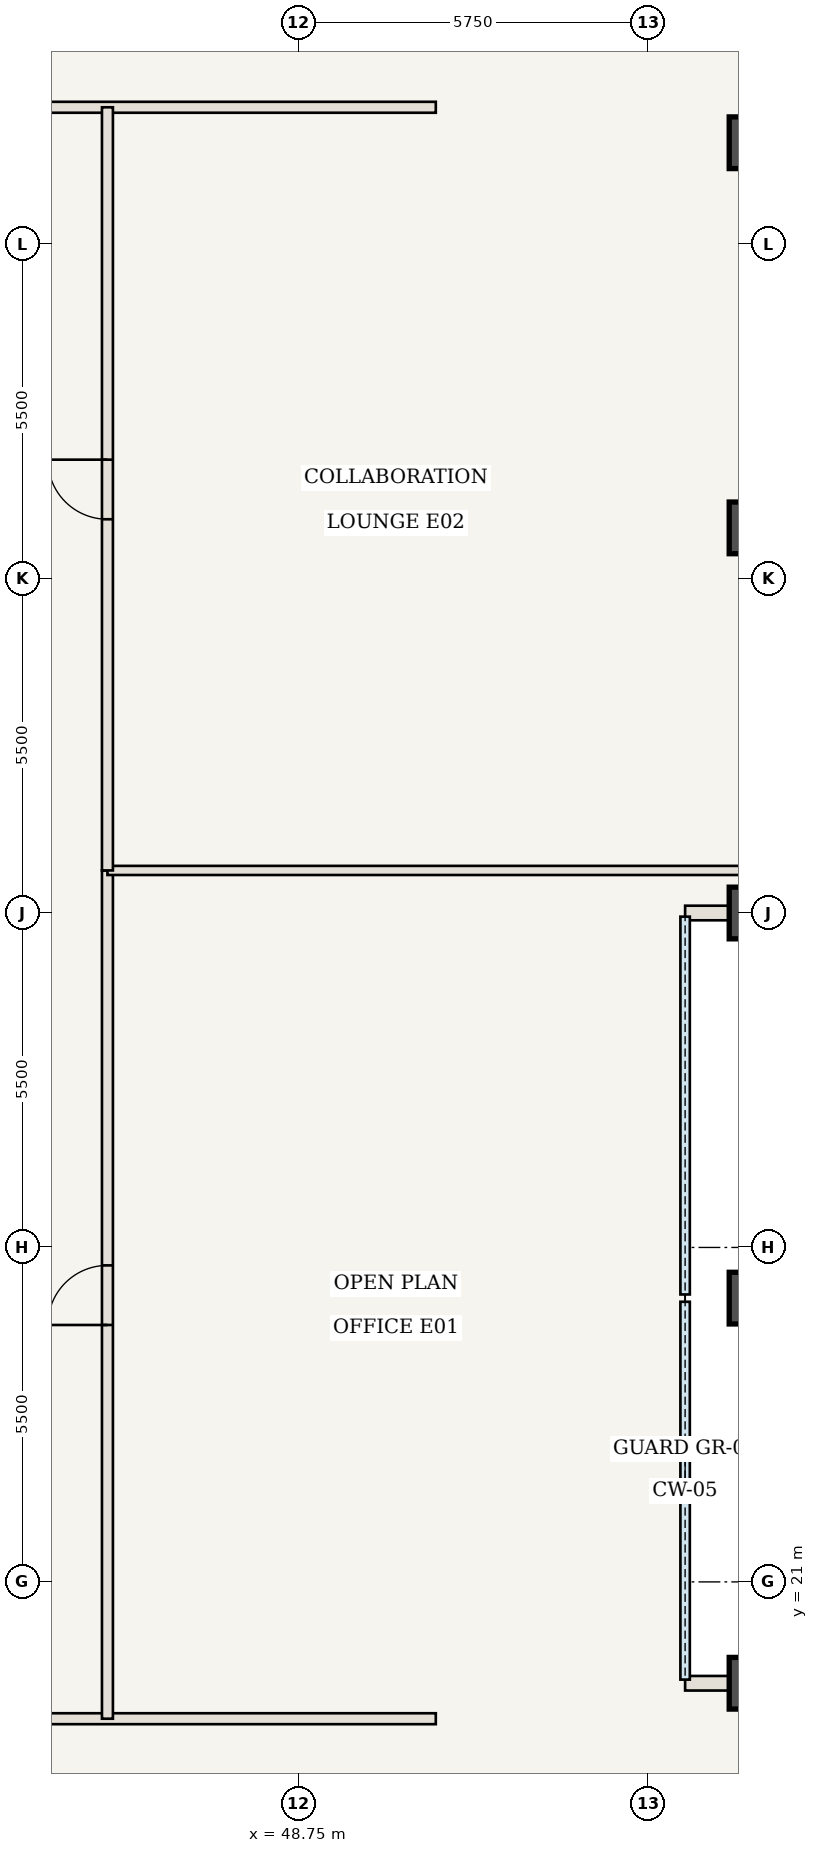
"""IFC4 building model, lengths in metres.
Left out: names, types, materials, properties, quantities, classifications, styles, units other than length and angle.
Written with IfcOpenShell. Run it as: python <this file> out.ifc"""

import sys

from ifc_helpers import new_model, si_unit, direction, frame, frame_2d, origin, origin_2d, place, context, subcontext, project, spatial, rectangle, extrude, element, fill, save


model = new_model("IFC4")
c1 = context("Model", 3, precision=1e-05, world=origin(), true_north=direction((0.0, 1.0)))
c2 = subcontext(c1, "Body", "Model", "MODEL_VIEW")
j1 = project(units=[si_unit("LENGTHUNIT", "METRE"), si_unit("PLANEANGLEUNIT", "RADIAN")], contexts=[c1])
p1 = place(None, origin())
s1 = spatial("IfcSite", under=j1, at=p1, CompositionType="ELEMENT")
p2 = place(p1, origin())
s2 = spatial("IfcBuilding", under=s1, at=p2, CompositionType="ELEMENT")
p3 = place(p2, frame((0.0, 0.0, 236.95)))
s3 = spatial("IfcBuildingStorey", under=s2, at=p3, CompositionType="ELEMENT", Elevation=236.95)
for number, where, z_axis, x_axis in (
    (1, (56.25, 19.333, 0.0), (0.0, 0.0, 1.0), (1.0, 0.0, 0.0)),
    (2, (56.25, 25.667, 0.0), (0.0, 0.0, 1.0), (1.0, 0.0, 0.0)),
    (3, (56.25, 32.0, 0.0), (0.0, 0.0, 1.0), (1.0, 0.0, 0.0)),
    (4, (56.25, 38.333, 0.0), (0.0, 0.0, 1.0), (1.0, 0.0, 0.0)),
    (5, (56.25, 44.667, 0.0), (0.0, 0.0, 1.0), (1.0, 0.0, 0.0)),
):
    element("IfcColumn", number, at=place(p3, frame(where, z_axis=z_axis, x_axis=x_axis)), inside=s3, PredefinedType="COLUMN", context=c2, shape_type="SweptSolid", body=[
        extrude(rectangle(XDim=0.85, YDim=0.85, at=origin_2d()), origin(), (0.0, 0.0, 1.0), 3.85),
    ])
p4 = place(p3, frame((39.233, 18.75, 0.0), z_axis=(0.0, 0.0, 1.0), x_axis=(1.0, 0.0, 0.0)))
e6 = element("IfcWall", 6, at=p4, inside=s3, PredefinedType="STANDARD", context=c2, shape_type="SweptSolid", body=[
    extrude(rectangle(XDim=11.767, YDim=0.18, at=frame_2d((5.883, 0.0))), origin(), (0.0, 0.0, 1.0), 3.685),
])
p5 = place(p4, frame((1.208, 0.0, 0.0)))
e7 = element("IfcOpeningElement", 7, at=p5, cuts=e6, PredefinedType="OPENING", context=c2, shape_type="SweptSolid", body=[
    extrude(rectangle(XDim=0.98, YDim=2.2, at=frame_2d((0.49, 1.1))), frame((0.0, 0.1, 0.0), z_axis=(0.0, -1.0, 0.0), x_axis=(1.0, 0.0, 0.0)), (0.0, 0.0, 1.0), 0.2),
])
p6 = place(p3, frame((32.6, 45.25, 0.0), z_axis=(0.0, 0.0, 1.0), x_axis=(1.0, 0.0, 0.0)))
e8 = element("IfcWall", 8, at=p6, inside=s3, PredefinedType="STANDARD", context=c2, shape_type="SweptSolid", body=[
    extrude(rectangle(XDim=18.4, YDim=0.18, at=frame_2d((9.2, 0.0))), origin(), (0.0, 0.0, 1.0), 3.685),
])
p7 = place(p6, frame((5.975, 0.0, 0.0)))
e9 = element("IfcOpeningElement", 9, at=p7, cuts=e8, PredefinedType="OPENING", context=c2, shape_type="SweptSolid", body=[
    extrude(rectangle(XDim=0.98, YDim=2.2, at=frame_2d((0.49, 1.1))), frame((0.0, 0.1, 0.0), z_axis=(0.0, -1.0, 0.0), x_axis=(1.0, 0.0, 0.0)), (0.0, 0.0, 1.0), 0.2),
])
p8 = place(p3, frame((45.6, 18.75, 0.0), z_axis=(0.0, 0.0, 1.0), x_axis=(0.0, 1.0, 0.0)))
e10 = element("IfcWall", 10, at=p8, inside=s3, PredefinedType="STANDARD", context=c2, shape_type="SweptSolid", body=[
    extrude(rectangle(XDim=13.95, YDim=0.18, at=frame_2d((6.975, 0.0))), origin(), (0.0, 0.0, 1.0), 3.685),
])
p9 = place(p8, frame((6.475, 0.0, 0.0)))
e11 = element("IfcOpeningElement", 11, at=p9, cuts=e10, PredefinedType="OPENING", context=c2, shape_type="SweptSolid", body=[
    extrude(rectangle(XDim=0.98, YDim=2.2, at=frame_2d((0.49, 1.1))), frame((0.0, 0.1, 0.0), z_axis=(0.0, -1.0, 0.0), x_axis=(1.0, 0.0, 0.0)), (0.0, 0.0, 1.0), 0.2),
])
p10 = place(p3, frame((45.6, 32.7, 0.0), z_axis=(0.0, 0.0, 1.0), x_axis=(1.0, 0.0, 0.0)))
e12 = element("IfcWall", 12, at=p10, inside=s3, PredefinedType="STANDARD", context=c2, shape_type="SweptSolid", body=[
    extrude(rectangle(XDim=10.59, YDim=0.15, at=frame_2d((5.295, 0.0))), origin(), (0.0, 0.0, 1.0), 3.685),
])
p11 = place(p3, frame((45.6, 32.7, 0.0), z_axis=(0.0, 0.0, 1.0), x_axis=(0.0, 1.0, 0.0)))
e13 = element("IfcWall", 13, at=p11, inside=s3, PredefinedType="STANDARD", context=c2, shape_type="SweptSolid", body=[
    extrude(rectangle(XDim=12.55, YDim=0.18, at=frame_2d((6.275, 0.0))), origin(), (0.0, 0.0, 1.0), 3.685),
])
p12 = place(p11, frame((5.775, 0.0, 0.0)))
e14 = element("IfcOpeningElement", 14, at=p12, cuts=e13, PredefinedType="OPENING", context=c2, shape_type="SweptSolid", body=[
    extrude(rectangle(XDim=0.98, YDim=2.2, at=frame_2d((0.49, 1.1))), frame((0.0, 0.1, 0.0), z_axis=(0.0, -1.0, 0.0), x_axis=(1.0, 0.0, 0.0)), (0.0, 0.0, 1.0), 0.2),
])
for number, where, z_axis, x_axis in (
    (15, (56.25, 19.333, 0.0), (0.0, 0.0, 1.0), (-1.0, 0.0, 0.0)),
    (16, (56.25, 32.0, 0.0), (0.0, 0.0, 1.0), (-1.0, 0.0, 0.0)),
):
    element("IfcWall", number, at=place(p3, frame(where, z_axis=z_axis, x_axis=x_axis)), inside=s3, PredefinedType="USERDEFINED", context=c2, shape_type="SweptSolid", body=[
        extrude(rectangle(XDim=1.15, YDim=0.24, at=frame_2d((0.575, 0.0))), origin(), (0.0, 0.0, 1.0), 2.985),
    ])
p13 = place(p9, origin())
e17 = element("IfcDoor", 17, at=p13, inside=s3, OperationType="SINGLE_SWING_LEFT", PredefinedType="DOOR", context=c2, shape_type="SweptSolid", body=[
    extrude(rectangle(XDim=0.98, YDim=2.2, at=frame_2d((0.49, 1.1))), frame((0.0, 0.025, 0.0), z_axis=(0.0, -1.0, 0.0), x_axis=(1.0, 0.0, 0.0)), (0.0, 0.0, 1.0), 0.05),
])
fill(e11, e17)
p14 = place(p12, origin())
e18 = element("IfcDoor", 18, at=p14, inside=s3, OperationType="SINGLE_SWING_RIGHT", PredefinedType="DOOR", context=c2, shape_type="SweptSolid", body=[
    extrude(rectangle(XDim=0.98, YDim=2.2, at=frame_2d((0.49, 1.1))), frame((0.0, 0.025, 0.0), z_axis=(0.0, -1.0, 0.0), x_axis=(1.0, 0.0, 0.0)), (0.0, 0.0, 1.0), 0.05),
])
fill(e14, e18)
save(model, sys.argv[1])
